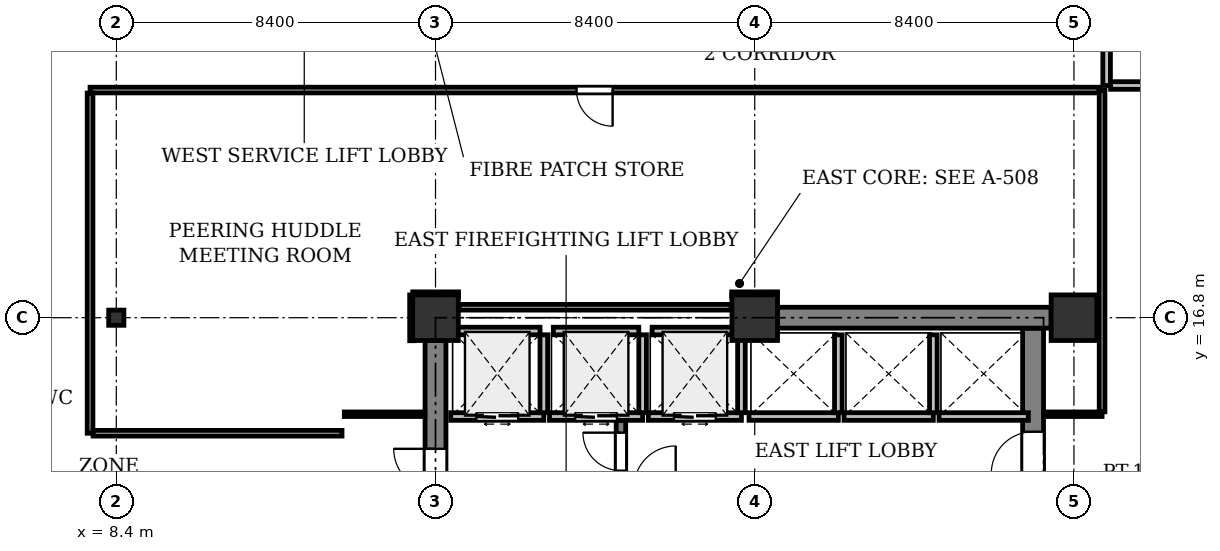
"""IFC4 building model, lengths in metres.
Left out: names, types, materials, properties, quantities, classifications, styles, units other than length and angle.
Written with IfcOpenShell. Run it as: python <this file> out.ifc"""

import sys

from ifc_helpers import new_model, si_unit, direction, frame, frame_2d, origin, origin_2d, place, context, subcontext, project, spatial, rectangle, i_section, extrude, element, fill, save


model = new_model("IFC4")
c1 = context("Model", 3, precision=1e-05, world=origin(), true_north=direction((0.0, 1.0)))
c2 = subcontext(c1, "Body", "Model", "MODEL_VIEW")
j1 = project(units=[si_unit("LENGTHUNIT", "METRE"), si_unit("PLANEANGLEUNIT", "RADIAN")], contexts=[c1])
p1 = place(None, origin())
s1 = spatial("IfcSite", under=j1, at=p1, CompositionType="ELEMENT")
p2 = place(p1, origin())
s2 = spatial("IfcBuilding", under=s1, at=p2, CompositionType="ELEMENT")
p3 = place(p2, frame((0.0, 0.0, 129.5)))
s3 = spatial("IfcBuildingStorey", under=s2, at=p3, CompositionType="ELEMENT", Elevation=129.5)
p4 = place(p3, frame((8.4, 16.8, 0.0), z_axis=(0.0, 0.0, 1.0), x_axis=(1.0, 0.0, 0.0)))
e1 = element("IfcColumn", 1, at=p4, inside=s3, PredefinedType="COLUMN", context=c2, shape_type="SweptSolid", body=[
    extrude(i_section(OverallWidth=0.4, OverallDepth=0.4, WebThickness=0.025, FlangeThickness=0.04, at=origin_2d()), origin(), (0.0, 0.0, 1.0), 4.1),
])
for number, where, z_axis, x_axis in (
    (2, (16.8, 16.8, 0.0), (0.0, 0.0, 1.0), (1.0, 0.0, 0.0)),
    (3, (25.2, 16.8, 0.0), (0.0, 0.0, 1.0), (1.0, 0.0, 0.0)),
    (4, (33.6, 16.8, 0.0), (0.0, 0.0, 1.0), (1.0, 0.0, 0.0)),
):
    element("IfcColumn", number, at=place(p3, frame(where, z_axis=z_axis, x_axis=x_axis)), inside=s3, PredefinedType="COLUMN", context=c2, shape_type="SweptSolid", body=[
        extrude(rectangle(XDim=1.2, YDim=1.2, at=origin_2d()), origin(), (0.0, 0.0, 1.0), 4.1),
    ])
p5 = place(p3, frame((32.525, 8.675, 0.0), z_axis=(0.0, 0.0, 1.0), x_axis=(0.0, 1.0, 0.0)))
e5 = element("IfcWall", 5, at=p5, inside=s3, PredefinedType="SHEAR", context=c2, shape_type="SweptSolid", body=[
    extrude(rectangle(XDim=7.85, YDim=0.55, at=frame_2d((3.925, 0.0))), origin(), (0.0, 0.0, 1.0), 3.825),
])
p6 = place(p5, frame((4.025, 0.0, 0.0)))
e6 = element("IfcOpeningElement", 6, at=p6, cuts=e5, PredefinedType="OPENING", context=c2, shape_type="SweptSolid", body=[
    extrude(rectangle(XDim=1.1, YDim=2.15, at=frame_2d((0.55, 1.075))), frame((0.0, 0.285, 0.0), z_axis=(0.0, -1.0, 0.0), x_axis=(1.0, 0.0, 0.0)), (0.0, 0.0, 1.0), 0.57),
])
p7 = place(p3, frame((16.8, 9.0, 0.0), z_axis=(0.0, 0.0, 1.0), x_axis=(0.0, 1.0, 0.0)))
e7 = element("IfcWall", 7, at=p7, inside=s3, PredefinedType="SHEAR", context=c2, shape_type="SweptSolid", body=[
    extrude(rectangle(XDim=7.2, YDim=0.55, at=frame_2d((3.6, 0.0))), origin(), (0.0, 0.0, 1.0), 3.825),
])
p8 = place(p7, frame((3.25, 0.0, 0.0)))
e8 = element("IfcOpeningElement", 8, at=p8, cuts=e7, PredefinedType="OPENING", context=c2, shape_type="SweptSolid", body=[
    extrude(rectangle(XDim=1.1, YDim=2.15, at=frame_2d((0.55, 1.075))), frame((0.0, 0.285, 0.0), z_axis=(0.0, -1.0, 0.0), x_axis=(1.0, 0.0, 0.0)), (0.0, 0.0, 1.0), 0.57),
])
p9 = place(p3, frame((25.8, 16.8, 0.0), z_axis=(0.0, 0.0, 1.0), x_axis=(1.0, 0.0, 0.0)))
e9 = element("IfcWall", 9, at=p9, inside=s3, PredefinedType="SHEAR", context=c2, shape_type="SweptSolid", body=[
    extrude(rectangle(XDim=7.2, YDim=0.55, at=frame_2d((3.6, 0.0))), origin(), (0.0, 0.0, 1.0), 3.825),
])
p10 = place(p3, frame((21.68, 12.45, 0.0), z_axis=(0.0, 0.0, 1.0), x_axis=(0.0, 1.0, 0.0)))
e10 = element("IfcWall", 10, at=p10, inside=s3, PredefinedType="SHEAR", context=c2, shape_type="SweptSolid", body=[
    extrude(rectangle(XDim=1.65, YDim=0.25, at=frame_2d((0.825, 0.0))), origin(), (0.0, 0.0, 1.0), 3.825),
])
p11 = place(p10, frame((0.325, 0.0, 0.0)))
e11 = element("IfcOpeningElement", 11, at=p11, cuts=e10, PredefinedType="OPENING", context=c2, shape_type="SweptSolid", body=[
    extrude(rectangle(XDim=1.0, YDim=2.15, at=frame_2d((0.5, 1.075))), frame((0.0, 0.135, 0.0), z_axis=(0.0, -1.0, 0.0), x_axis=(1.0, 0.0, 0.0)), (0.0, 0.0, 1.0), 0.27),
])
p12 = place(p3, frame((17.2, 14.2, 0.0), z_axis=(0.0, 0.0, 1.0), x_axis=(1.0, 0.0, 0.0)))
e12 = element("IfcWall", 12, at=p12, inside=s3, PredefinedType="PARTITIONING", context=c2, shape_type="SweptSolid", body=[
    extrude(rectangle(XDim=2.45, YDim=0.2, at=frame_2d((1.225, 0.0))), origin(), (0.0, 0.0, 1.0), 3.825),
])
p13 = place(p12, frame((0.675, 0.0, 0.0)))
e13 = element("IfcOpeningElement", 13, at=p13, cuts=e12, PredefinedType="OPENING", context=c2, shape_type="SweptSolid", body=[
    extrude(rectangle(XDim=1.1, YDim=2.2, at=frame_2d((0.55, 1.1))), frame((0.0, 0.11, 0.0), z_axis=(0.0, -1.0, 0.0), x_axis=(1.0, 0.0, 0.0)), (0.0, 0.0, 1.0), 0.22),
])
p14 = place(p3, frame((19.65, 14.3, 0.0), z_axis=(0.0, 0.0, 1.0), x_axis=(0.0, 1.0, 0.0)))
e14 = element("IfcWall", 14, at=p14, inside=s3, PredefinedType="PARTITIONING", context=c2, shape_type="SweptSolid", body=[
    extrude(rectangle(XDim=2.05, YDim=0.2, at=frame_2d((1.025, 0.0))), origin(), (0.0, 0.0, 1.0), 3.825),
])
p15 = place(p3, frame((17.3, 16.45, 0.0), z_axis=(0.0, 0.0, 1.0), x_axis=(1.0, 0.0, 0.0)))
e15 = element("IfcWall", 15, at=p15, inside=s3, PredefinedType="PARTITIONING", context=c2, shape_type="SweptSolid", body=[
    extrude(rectangle(XDim=2.25, YDim=0.2, at=frame_2d((1.125, 0.0))), origin(), (0.0, 0.0, 1.0), 3.825),
])
p16 = place(p3, frame((19.8, 14.2, 0.0), z_axis=(0.0, 0.0, 1.0), x_axis=(1.0, 0.0, 0.0)))
e16 = element("IfcWall", 16, at=p16, inside=s3, PredefinedType="PARTITIONING", context=c2, shape_type="SweptSolid", body=[
    extrude(rectangle(XDim=2.45, YDim=0.2, at=frame_2d((1.225, 0.0))), origin(), (0.0, 0.0, 1.0), 3.825),
])
p17 = place(p16, frame((0.675, 0.0, 0.0)))
e17 = element("IfcOpeningElement", 17, at=p17, cuts=e16, PredefinedType="OPENING", context=c2, shape_type="SweptSolid", body=[
    extrude(rectangle(XDim=1.1, YDim=2.2, at=frame_2d((0.55, 1.1))), frame((0.0, 0.11, 0.0), z_axis=(0.0, -1.0, 0.0), x_axis=(1.0, 0.0, 0.0)), (0.0, 0.0, 1.0), 0.22),
])
p18 = place(p3, frame((22.25, 14.3, 0.0), z_axis=(0.0, 0.0, 1.0), x_axis=(0.0, 1.0, 0.0)))
e18 = element("IfcWall", 18, at=p18, inside=s3, PredefinedType="PARTITIONING", context=c2, shape_type="SweptSolid", body=[
    extrude(rectangle(XDim=2.05, YDim=0.2, at=frame_2d((1.025, 0.0))), origin(), (0.0, 0.0, 1.0), 3.825),
])
p19 = place(p3, frame((19.9, 16.45, 0.0), z_axis=(0.0, 0.0, 1.0), x_axis=(1.0, 0.0, 0.0)))
e19 = element("IfcWall", 19, at=p19, inside=s3, PredefinedType="PARTITIONING", context=c2, shape_type="SweptSolid", body=[
    extrude(rectangle(XDim=2.25, YDim=0.2, at=frame_2d((1.125, 0.0))), origin(), (0.0, 0.0, 1.0), 3.825),
])
p20 = place(p3, frame((22.4, 14.2, 0.0), z_axis=(0.0, 0.0, 1.0), x_axis=(1.0, 0.0, 0.0)))
e20 = element("IfcWall", 20, at=p20, inside=s3, PredefinedType="PARTITIONING", context=c2, shape_type="SweptSolid", body=[
    extrude(rectangle(XDim=2.45, YDim=0.2, at=frame_2d((1.225, 0.0))), origin(), (0.0, 0.0, 1.0), 3.825),
])
p21 = place(p20, frame((0.675, 0.0, 0.0)))
e21 = element("IfcOpeningElement", 21, at=p21, cuts=e20, PredefinedType="OPENING", context=c2, shape_type="SweptSolid", body=[
    extrude(rectangle(XDim=1.1, YDim=2.2, at=frame_2d((0.55, 1.1))), frame((0.0, 0.11, 0.0), z_axis=(0.0, -1.0, 0.0), x_axis=(1.0, 0.0, 0.0)), (0.0, 0.0, 1.0), 0.22),
])
p22 = place(p3, frame((24.85, 14.3, 0.0), z_axis=(0.0, 0.0, 1.0), x_axis=(0.0, 1.0, 0.0)))
e22 = element("IfcWall", 22, at=p22, inside=s3, PredefinedType="PARTITIONING", context=c2, shape_type="SweptSolid", body=[
    extrude(rectangle(XDim=2.05, YDim=0.2, at=frame_2d((1.025, 0.0))), origin(), (0.0, 0.0, 1.0), 3.825),
])
p23 = place(p3, frame((22.5, 16.45, 0.0), z_axis=(0.0, 0.0, 1.0), x_axis=(1.0, 0.0, 0.0)))
e23 = element("IfcWall", 23, at=p23, inside=s3, PredefinedType="PARTITIONING", context=c2, shape_type="SweptSolid", body=[
    extrude(rectangle(XDim=2.25, YDim=0.2, at=frame_2d((1.125, 0.0))), origin(), (0.0, 0.0, 1.0), 3.825),
])
p24 = place(p3, frame((25.05, 14.2, 0.0), z_axis=(0.0, 0.0, 1.0), x_axis=(1.0, 0.0, 0.0)))
e24 = element("IfcWall", 24, at=p24, inside=s3, PredefinedType="PARTITIONING", context=c2, shape_type="SweptSolid", body=[
    extrude(rectangle(XDim=2.35, YDim=0.2, at=frame_2d((1.175, 0.0))), origin(), (0.0, 0.0, 1.0), 3.825),
])
p25 = place(p3, frame((27.4, 14.3, 0.0), z_axis=(0.0, 0.0, 1.0), x_axis=(0.0, 1.0, 0.0)))
e25 = element("IfcWall", 25, at=p25, inside=s3, PredefinedType="PARTITIONING", context=c2, shape_type="SweptSolid", body=[
    extrude(rectangle(XDim=2.05, YDim=0.2, at=frame_2d((1.025, 0.0))), origin(), (0.0, 0.0, 1.0), 3.825),
])
p26 = place(p3, frame((27.55, 14.2, 0.0), z_axis=(0.0, 0.0, 1.0), x_axis=(1.0, 0.0, 0.0)))
e26 = element("IfcWall", 26, at=p26, inside=s3, PredefinedType="PARTITIONING", context=c2, shape_type="SweptSolid", body=[
    extrude(rectangle(XDim=2.35, YDim=0.2, at=frame_2d((1.175, 0.0))), origin(), (0.0, 0.0, 1.0), 3.825),
])
p27 = place(p3, frame((29.9, 14.3, 0.0), z_axis=(0.0, 0.0, 1.0), x_axis=(0.0, 1.0, 0.0)))
e27 = element("IfcWall", 27, at=p27, inside=s3, PredefinedType="PARTITIONING", context=c2, shape_type="SweptSolid", body=[
    extrude(rectangle(XDim=2.05, YDim=0.2, at=frame_2d((1.025, 0.0))), origin(), (0.0, 0.0, 1.0), 3.825),
])
p28 = place(p3, frame((30.05, 14.2, 0.0), z_axis=(0.0, 0.0, 1.0), x_axis=(1.0, 0.0, 0.0)))
e28 = element("IfcWall", 28, at=p28, inside=s3, PredefinedType="PARTITIONING", context=c2, shape_type="SweptSolid", body=[
    extrude(rectangle(XDim=2.35, YDim=0.2, at=frame_2d((1.175, 0.0))), origin(), (0.0, 0.0, 1.0), 3.825),
])
p29 = place(p3, frame((14.4, 14.26, 0.0), z_axis=(0.0, 0.0, 1.0), x_axis=(1.0, 0.0, 0.0)))
e29 = element("IfcWall", 29, at=p29, inside=s3, PredefinedType="PARTITIONING", context=c2, shape_type="SweptSolid", body=[
    extrude(rectangle(XDim=2.121, YDim=0.12, at=frame_2d((1.061, 0.0))), origin(), (0.0, 0.0, 1.0), 3.825),
])
p30 = place(p3, frame((16.181, 16.194, 0.0), z_axis=(0.0, 0.0, 1.0), x_axis=(-0.000809880277, 0.999999672047, 0.0)))
e30 = element("IfcWall", 30, at=p30, inside=s3, PredefinedType="PARTITIONING", context=c2, shape_type="SweptSolid", body=[
    extrude(rectangle(XDim=1.206, YDim=0.12, at=frame_2d((0.603, 0.0))), origin(), (0.0, 0.0, 1.0), 3.292),
])
p31 = place(p3, frame((16.2, 17.42, 0.0), z_axis=(0.0, 0.0, 1.0), x_axis=(0.999999815526, -0.000607410295, 0.0)))
e31 = element("IfcWall", 31, at=p31, inside=s3, PredefinedType="PARTITIONING", context=c2, shape_type="SweptSolid", body=[
    extrude(rectangle(XDim=1.206, YDim=0.12, at=frame_2d((0.603, 0.0))), origin(), (0.0, 0.0, 1.0), 3.297),
])
p32 = place(p3, frame((17.42, 17.075, 0.0), z_axis=(0.0, 0.0, 1.0), x_axis=(1.0, 0.0, 0.0)))
e32 = element("IfcWall", 32, at=p32, inside=s3, PredefinedType="PARTITIONING", context=c2, shape_type="SweptSolid", body=[
    extrude(rectangle(XDim=7.16, YDim=0.15, at=frame_2d((3.58, 0.0))), origin(), (0.0, 0.0, 1.0), 3.469),
])
p33 = place(p3, frame((24.594, 17.419, 0.0), z_axis=(0.0, 0.0, 1.0), x_axis=(0.999999815526, 0.000607410295, 0.0)))
e33 = element("IfcWall", 33, at=p33, inside=s3, PredefinedType="PARTITIONING", context=c2, shape_type="SweptSolid", body=[
    extrude(rectangle(XDim=1.206, YDim=0.12, at=frame_2d((0.603, 0.0))), origin(), (0.0, 0.0, 1.0), 3.297),
])
p34 = place(p3, frame((32.804, 14.26, 0.0), z_axis=(0.0, 0.0, 1.0), x_axis=(1.0, 0.0, 0.0)))
e34 = element("IfcWall", 34, at=p34, inside=s3, PredefinedType="PARTITIONING", context=c2, shape_type="SweptSolid", body=[
    extrude(rectangle(XDim=1.536, YDim=0.12, at=frame_2d((0.768, 0.0))), origin(), (0.0, 0.0, 1.0), 3.297),
])
p35 = place(p3, frame((34.34, 14.324, 0.0), z_axis=(0.0, 0.0, 1.0), x_axis=(0.0, 1.0, 0.0)))
e35 = element("IfcWall", 35, at=p35, inside=s3, PredefinedType="PARTITIONING", context=c2, shape_type="SweptSolid", body=[
    extrude(rectangle(XDim=8.466, YDim=0.15, at=frame_2d((4.233, 0.0))), origin(), (0.0, 0.0, 1.0), 3.292),
])
p36 = place(p3, frame((34.261, 22.79, 0.0), z_axis=(0.0, 0.0, 1.0), x_axis=(-1.0, 0.0, 0.0)))
e36 = element("IfcWall", 36, at=p36, inside=s3, PredefinedType="PARTITIONING", context=c2, shape_type="SweptSolid", body=[
    extrude(rectangle(XDim=26.551, YDim=0.15, at=frame_2d((13.275, 0.0))), origin(), (0.0, 0.0, 1.0), 3.297),
])
p37 = place(p36, frame((12.801, 0.0, 0.0)))
e37 = element("IfcOpeningElement", 37, at=p37, cuts=e36, PredefinedType="OPENING", context=c2, shape_type="SweptSolid", body=[
    extrude(rectangle(XDim=0.95, YDim=2.15, at=frame_2d((0.475, 1.075))), frame((0.0, 0.085, 0.0), z_axis=(0.0, -1.0, 0.0), x_axis=(1.0, 0.0, 0.0)), (0.0, 0.0, 1.0), 0.17),
])
p38 = place(p3, frame((7.71, 22.711, 0.0), z_axis=(0.0, 0.0, 1.0), x_axis=(0.0, -1.0, 0.0)))
e38 = element("IfcWall", 38, at=p38, inside=s3, PredefinedType="PARTITIONING", context=c2, shape_type="SweptSolid", body=[
    extrude(rectangle(XDim=8.951, YDim=0.15, at=frame_2d((4.476, 0.0))), origin(), (0.0, 0.0, 1.0), 3.292),
])
p39 = place(p3, frame((7.789, 13.76, 0.0), z_axis=(0.0, 0.0, 1.0), x_axis=(1.0, 0.0, 0.0)))
e39 = element("IfcWall", 39, at=p39, inside=s3, PredefinedType="PARTITIONING", context=c2, shape_type="SweptSolid", body=[
    extrude(rectangle(XDim=6.551, YDim=0.15, at=frame_2d((3.275, 0.0))), origin(), (0.0, 0.0, 1.0), 3.297),
])
p40 = place(p3, frame((34.46, 25.031, 0.0), z_axis=(0.0, 0.0, 1.0), x_axis=(0.0, -1.0, 0.0)))
e40 = element("IfcWall", 40, at=p40, inside=s3, PredefinedType="PARTITIONING", context=c2, shape_type="SweptSolid", body=[
    extrude(rectangle(XDim=2.121, YDim=0.2, at=frame_2d((1.061, 0.0))), origin(), (0.0, 0.0, 1.0), 3.825),
])
p41 = place(p3, frame((34.564, 22.91, 0.0), z_axis=(0.0, 0.0, 1.0), x_axis=(1.0, 0.0, 0.0)))
e41 = element("IfcWall", 41, at=p41, inside=s3, PredefinedType="PARTITIONING", context=c2, shape_type="SweptSolid", body=[
    extrude(rectangle(XDim=2.086, YDim=0.2, at=frame_2d((1.043, 0.0))), origin(), (0.0, 0.0, 1.0), 3.825),
])
p42 = place(p6, origin())
e42 = element("IfcDoor", 42, at=p42, inside=s3, OperationType="SINGLE_SWING_LEFT", PredefinedType="DOOR", context=c2, shape_type="SweptSolid", body=[
    extrude(rectangle(XDim=1.1, YDim=2.15, at=frame_2d((0.55, 1.075))), frame((0.0, 0.025, 0.0), z_axis=(0.0, -1.0, 0.0), x_axis=(1.0, 0.0, 0.0)), (0.0, 0.0, 1.0), 0.05),
])
fill(e6, e42)
p43 = place(p8, origin())
e43 = element("IfcDoor", 43, at=p43, inside=s3, OperationType="SINGLE_SWING_RIGHT", PredefinedType="DOOR", context=c2, shape_type="SweptSolid", body=[
    extrude(rectangle(XDim=1.1, YDim=2.15, at=frame_2d((0.55, 1.075))), frame((0.0, 0.025, 0.0), z_axis=(0.0, -1.0, 0.0), x_axis=(1.0, 0.0, 0.0)), (0.0, 0.0, 1.0), 0.05),
])
fill(e8, e43)
p44 = place(p11, origin())
e44 = element("IfcDoor", 44, at=p44, inside=s3, OperationType="SINGLE_SWING_RIGHT", PredefinedType="DOOR", context=c2, shape_type="SweptSolid", body=[
    extrude(rectangle(XDim=1.0, YDim=2.15, at=frame_2d((0.5, 1.075))), frame((0.0, 0.025, 0.0), z_axis=(0.0, -1.0, 0.0), x_axis=(1.0, 0.0, 0.0)), (0.0, 0.0, 1.0), 0.05),
])
fill(e11, e44)
p45 = place(p13, origin())
e45 = element("IfcDoor", 45, at=p45, inside=s3, OperationType="DOUBLE_DOOR_SLIDING", PredefinedType="DOOR", context=c2, shape_type="SweptSolid", body=[
    extrude(rectangle(XDim=1.1, YDim=2.2, at=frame_2d((0.55, 1.1))), frame((0.0, 0.025, 0.0), z_axis=(0.0, -1.0, 0.0), x_axis=(1.0, 0.0, 0.0)), (0.0, 0.0, 1.0), 0.05),
])
fill(e13, e45)
p46 = place(p17, origin())
e46 = element("IfcDoor", 46, at=p46, inside=s3, OperationType="DOUBLE_DOOR_SLIDING", PredefinedType="DOOR", context=c2, shape_type="SweptSolid", body=[
    extrude(rectangle(XDim=1.1, YDim=2.2, at=frame_2d((0.55, 1.1))), frame((0.0, 0.025, 0.0), z_axis=(0.0, -1.0, 0.0), x_axis=(1.0, 0.0, 0.0)), (0.0, 0.0, 1.0), 0.05),
])
fill(e17, e46)
p47 = place(p21, origin())
e47 = element("IfcDoor", 47, at=p47, inside=s3, OperationType="DOUBLE_DOOR_SLIDING", PredefinedType="DOOR", context=c2, shape_type="SweptSolid", body=[
    extrude(rectangle(XDim=1.1, YDim=2.2, at=frame_2d((0.55, 1.1))), frame((0.0, 0.025, 0.0), z_axis=(0.0, -1.0, 0.0), x_axis=(1.0, 0.0, 0.0)), (0.0, 0.0, 1.0), 0.05),
])
fill(e21, e47)
p48 = place(p37, origin())
e48 = element("IfcDoor", 48, at=p48, inside=s3, OperationType="SINGLE_SWING_LEFT", PredefinedType="DOOR", context=c2, shape_type="SweptSolid", body=[
    extrude(rectangle(XDim=0.95, YDim=2.15, at=frame_2d((0.475, 1.075))), frame((0.0, 0.025, 0.0), z_axis=(0.0, -1.0, 0.0), x_axis=(1.0, 0.0, 0.0)), (0.0, 0.0, 1.0), 0.05),
])
fill(e37, e48)
save(model, sys.argv[1])
